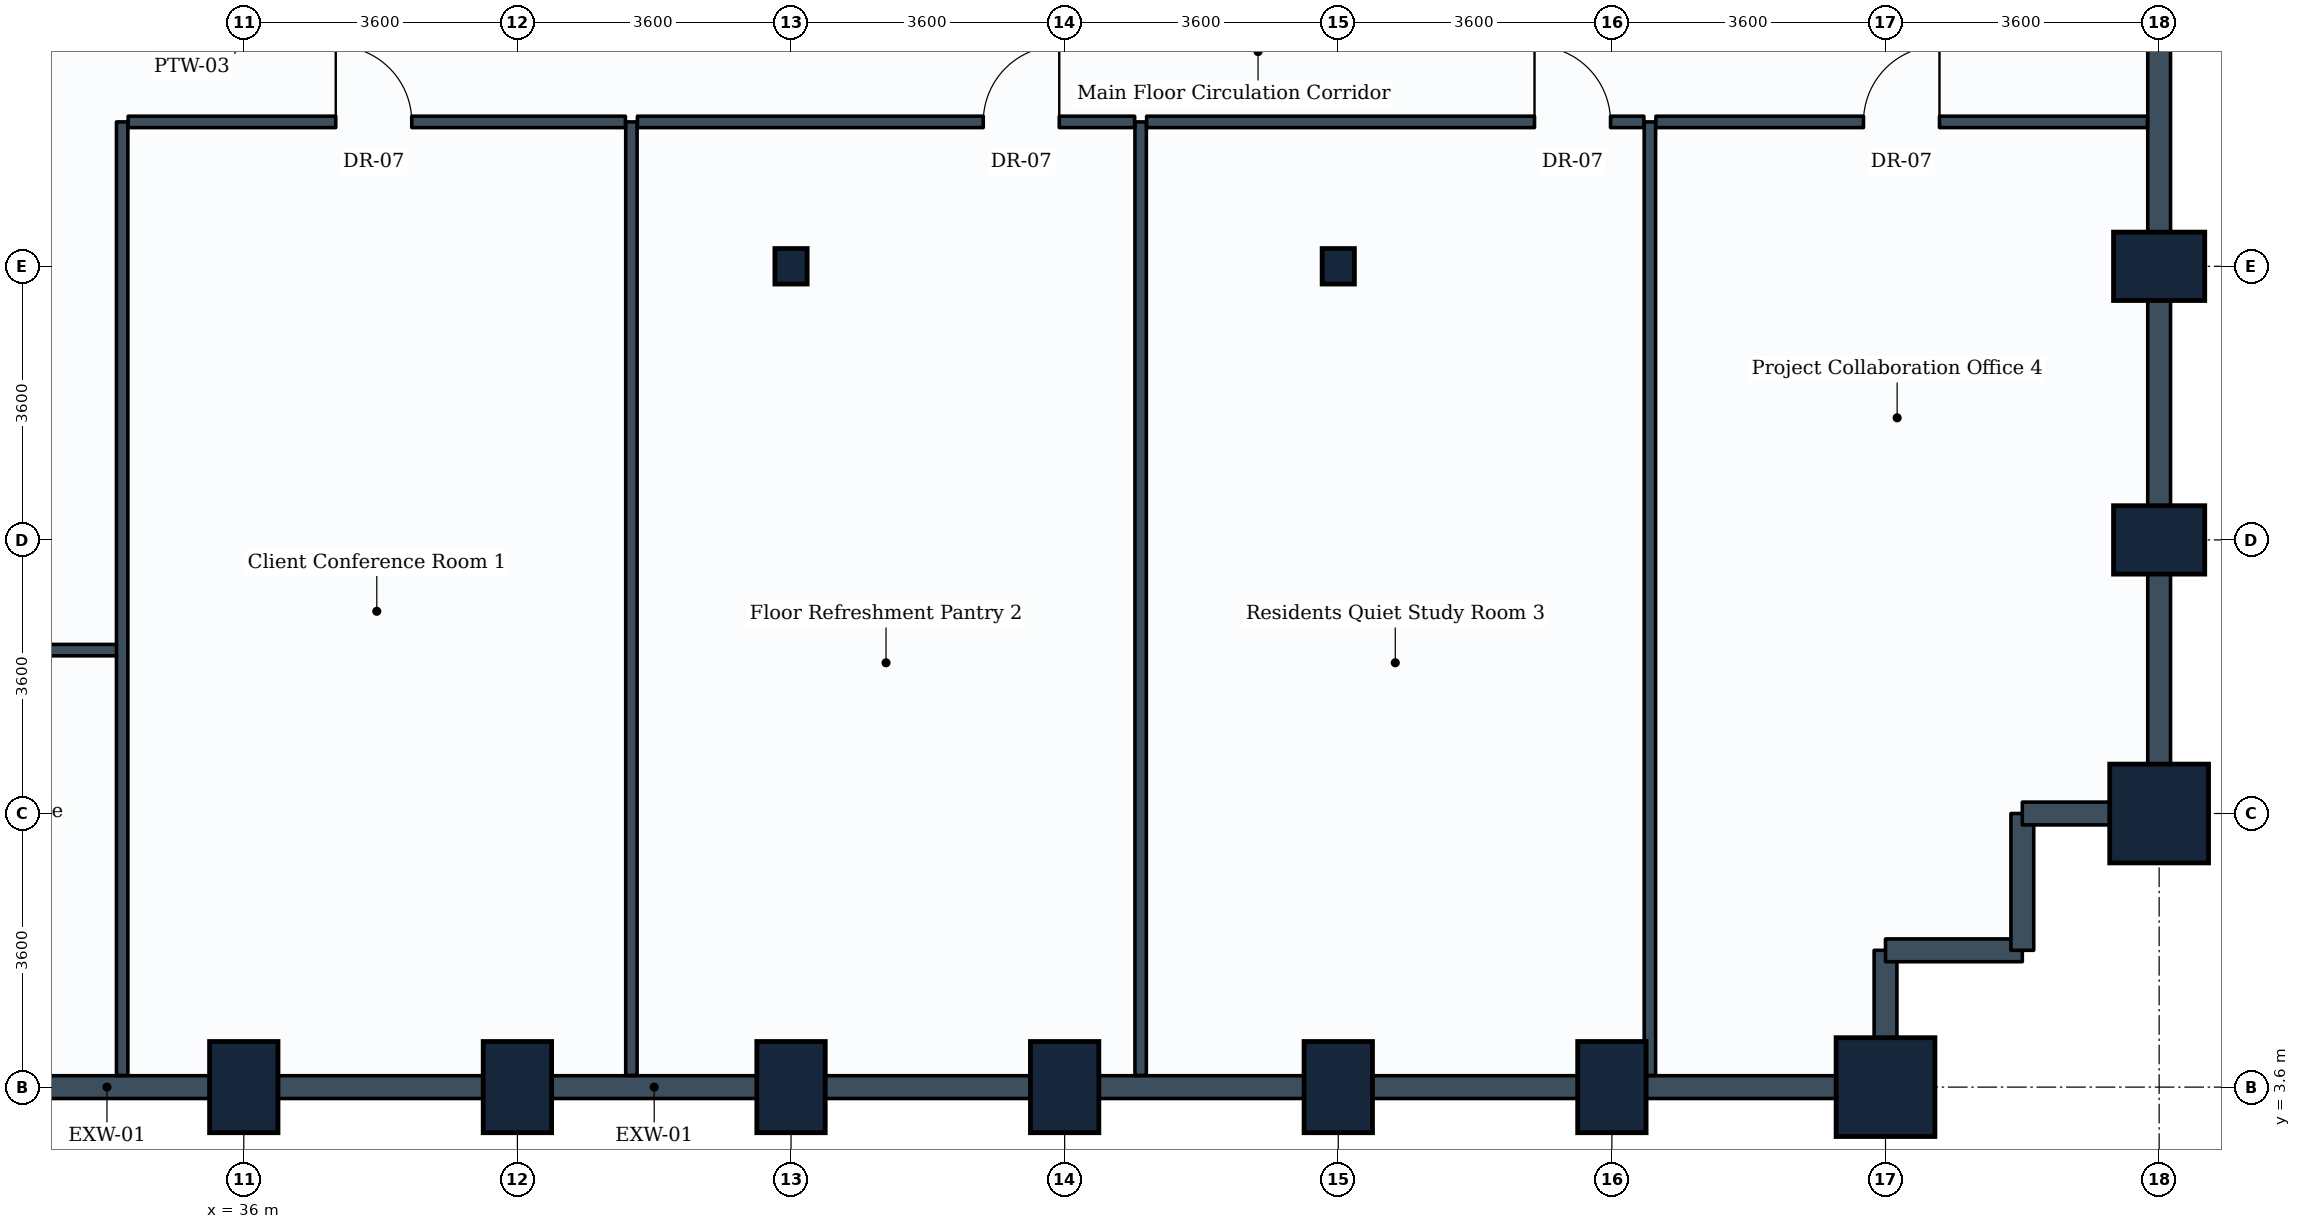
"""IFC4 building model, lengths in metres.
Left out: names, types, materials, properties, quantities, classifications, styles, units other than length and angle.
Written with IfcOpenShell. Run it as: python <this file> out.ifc"""

import sys

from ifc_helpers import new_model, si_unit, direction, frame, frame_2d, origin, origin_2d, place, context, subcontext, project, spatial, rectangle, i_section, extrude, element, fill, save


model = new_model("IFC4")
c1 = context("Model", 3, precision=1e-05, world=origin(), true_north=direction((0.0, 1.0)))
c2 = subcontext(c1, "Body", "Model", "MODEL_VIEW")
j1 = project(units=[si_unit("LENGTHUNIT", "METRE"), si_unit("PLANEANGLEUNIT", "RADIAN")], contexts=[c1])
p1 = place(None, origin())
s1 = spatial("IfcSite", under=j1, at=p1, CompositionType="ELEMENT")
p2 = place(p1, origin())
s2 = spatial("IfcBuilding", under=s1, at=p2, CompositionType="ELEMENT")
p3 = place(p2, frame((0.0, 0.0, 35.7)))
s3 = spatial("IfcBuildingStorey", under=s2, at=p3, CompositionType="ELEMENT", Elevation=35.7)
for number, where, z_axis, x_axis in (
    (1, (36.0, 3.6, 0.0), (0.0, 0.0, 1.0), (1.0, 0.0, 0.0)),
    (2, (39.6, 3.6, 0.0), (0.0, 0.0, 1.0), (1.0, 0.0, 0.0)),
    (3, (43.2, 3.6, 0.0), (0.0, 0.0, 1.0), (1.0, 0.0, 0.0)),
):
    element("IfcColumn", number, at=place(p3, frame(where, z_axis=z_axis, x_axis=x_axis)), inside=s3, PredefinedType="COLUMN", context=c2, shape_type="SweptSolid", body=[
        extrude(rectangle(XDim=0.9, YDim=1.2, at=origin_2d()), origin(), (0.0, 0.0, 1.0), 3.9),
    ])
p4 = place(p3, frame((43.2, 14.4, 0.0), z_axis=(0.0, 0.0, 1.0), x_axis=(1.0, 0.0, 0.0)))
e4 = element("IfcColumn", 4, at=p4, inside=s3, PredefinedType="COLUMN", context=c2, shape_type="SweptSolid", body=[
    extrude(i_section(OverallWidth=0.424, OverallDepth=0.467, WebThickness=0.033, FlangeThickness=0.053, FilletRadius=0.015, at=origin_2d()), origin(), (0.0, 0.0, 1.0), 3.9),
])
for number, where, z_axis, x_axis in (
    (5, (46.8, 3.6, 0.0), (0.0, 0.0, 1.0), (1.0, 0.0, 0.0)),
    (6, (50.4, 3.6, 0.0), (0.0, 0.0, 1.0), (1.0, 0.0, 0.0)),
):
    element("IfcColumn", number, at=place(p3, frame(where, z_axis=z_axis, x_axis=x_axis)), inside=s3, PredefinedType="COLUMN", context=c2, shape_type="SweptSolid", body=[
        extrude(rectangle(XDim=0.9, YDim=1.2, at=origin_2d()), origin(), (0.0, 0.0, 1.0), 3.9),
    ])
p5 = place(p3, frame((50.4, 14.4, 0.0), z_axis=(0.0, 0.0, 1.0), x_axis=(1.0, 0.0, 0.0)))
e7 = element("IfcColumn", 7, at=p5, inside=s3, PredefinedType="COLUMN", context=c2, shape_type="SweptSolid", body=[
    extrude(i_section(OverallWidth=0.424, OverallDepth=0.467, WebThickness=0.033, FlangeThickness=0.053, FilletRadius=0.015, at=origin_2d()), origin(), (0.0, 0.0, 1.0), 3.9),
])
p6 = place(p3, frame((54.0, 3.6, 0.0), z_axis=(0.0, 0.0, 1.0), x_axis=(1.0, 0.0, 0.0)))
e8 = element("IfcColumn", 8, at=p6, inside=s3, PredefinedType="COLUMN", context=c2, shape_type="SweptSolid", body=[
    extrude(rectangle(XDim=0.9, YDim=1.2, at=origin_2d()), origin(), (0.0, 0.0, 1.0), 3.9),
])
for number, where, z_axis, x_axis in (
    (9, (57.6, 3.6, 0.0), (0.0, 0.0, 1.0), (1.0, 0.0, 0.0)),
    (10, (61.2, 7.2, 0.0), (0.0, 0.0, 1.0), (1.0, 0.0, 0.0)),
):
    element("IfcColumn", number, at=place(p3, frame(where, z_axis=z_axis, x_axis=x_axis)), inside=s3, PredefinedType="COLUMN", context=c2, shape_type="SweptSolid", body=[
        extrude(rectangle(XDim=1.3, YDim=1.3, at=origin_2d()), origin(), (0.0, 0.0, 1.0), 3.9),
    ])
for number, where, z_axis, x_axis in (
    (11, (61.2, 10.8, 0.0), (0.0, 0.0, 1.0), (0.0, 1.0, 0.0)),
    (12, (61.2, 14.4, 0.0), (0.0, 0.0, 1.0), (0.0, 1.0, 0.0)),
):
    element("IfcColumn", number, at=place(p3, frame(where, z_axis=z_axis, x_axis=x_axis)), inside=s3, PredefinedType="COLUMN", context=c2, shape_type="SweptSolid", body=[
        extrude(rectangle(XDim=0.9, YDim=1.2, at=origin_2d()), origin(), (0.0, 0.0, 1.0), 3.9),
    ])
for number, where, z_axis, x_axis in (
    (13, (36.0, 3.6, 0.0), (0.0, 0.0, 1.0), (-1.0, 0.0, 0.0)),
    (14, (39.6, 3.6, 0.0), (0.0, 0.0, 1.0), (-1.0, 0.0, 0.0)),
):
    element("IfcWall", number, at=place(p3, frame(where, z_axis=z_axis, x_axis=x_axis)), inside=s3, PredefinedType="STANDARD", context=c2, shape_type="SweptSolid", body=[
        extrude(rectangle(XDim=3.6, YDim=0.3, at=frame_2d((1.8, 0.0))), origin(), (0.0, 0.0, 1.0), 2.93),
    ])
p7 = place(p3, frame((43.2, 3.6, 0.0), z_axis=(0.0, 0.0, 1.0), x_axis=(-1.0, 0.0, 0.0)))
e15 = element("IfcWall", 15, at=p7, inside=s3, PredefinedType="STANDARD", context=c2, shape_type="SweptSolid", body=[
    extrude(rectangle(XDim=3.6, YDim=0.3, at=frame_2d((1.8, 0.0))), origin(), (0.0, 0.0, 1.0), 2.93),
])
p8 = place(p3, frame((46.8, 3.6, 0.0), z_axis=(0.0, 0.0, 1.0), x_axis=(-1.0, 0.0, 0.0)))
e16 = element("IfcWall", 16, at=p8, inside=s3, PredefinedType="STANDARD", context=c2, shape_type="SweptSolid", body=[
    extrude(rectangle(XDim=3.6, YDim=0.3, at=frame_2d((1.8, 0.0))), origin(), (0.0, 0.0, 1.0), 2.93),
])
p9 = place(p3, frame((50.4, 3.6, 0.0), z_axis=(0.0, 0.0, 1.0), x_axis=(-1.0, 0.0, 0.0)))
e17 = element("IfcWall", 17, at=p9, inside=s3, PredefinedType="STANDARD", context=c2, shape_type="SweptSolid", body=[
    extrude(rectangle(XDim=3.6, YDim=0.3, at=frame_2d((1.8, 0.0))), origin(), (0.0, 0.0, 1.0), 2.93),
])
for number, where, z_axis, x_axis in (
    (18, (54.0, 3.6, 0.0), (0.0, 0.0, 1.0), (-1.0, 0.0, 0.0)),
    (19, (57.6, 3.6, 0.0), (0.0, 0.0, 1.0), (-1.0, 0.0, 0.0)),
):
    element("IfcWall", number, at=place(p3, frame(where, z_axis=z_axis, x_axis=x_axis)), inside=s3, PredefinedType="STANDARD", context=c2, shape_type="SweptSolid", body=[
        extrude(rectangle(XDim=3.6, YDim=0.3, at=frame_2d((1.8, 0.0))), origin(), (0.0, 0.0, 1.0), 2.93),
    ])
p10 = place(p3, frame((57.6, 5.4, 0.0), z_axis=(0.0, 0.0, 1.0), x_axis=(0.0, -1.0, 0.0)))
e20 = element("IfcWall", 20, at=p10, inside=s3, PredefinedType="STANDARD", context=c2, shape_type="SweptSolid", body=[
    extrude(rectangle(XDim=1.8, YDim=0.3, at=frame_2d((0.9, 0.0))), origin(), (0.0, 0.0, 1.0), 2.93),
])
p11 = place(p3, frame((59.4, 5.4, 0.0), z_axis=(0.0, 0.0, 1.0), x_axis=(-1.0, 0.0, 0.0)))
e21 = element("IfcWall", 21, at=p11, inside=s3, PredefinedType="STANDARD", context=c2, shape_type="SweptSolid", body=[
    extrude(rectangle(XDim=1.8, YDim=0.3, at=frame_2d((0.9, 0.0))), origin(), (0.0, 0.0, 1.0), 3.635),
])
p12 = place(p3, frame((59.4, 7.2, 0.0), z_axis=(0.0, 0.0, 1.0), x_axis=(0.0, -1.0, 0.0)))
e22 = element("IfcWall", 22, at=p12, inside=s3, PredefinedType="STANDARD", context=c2, shape_type="SweptSolid", body=[
    extrude(rectangle(XDim=1.8, YDim=0.3, at=frame_2d((0.9, 0.0))), origin(), (0.0, 0.0, 1.0), 3.635),
])
p13 = place(p3, frame((61.2, 7.2, 0.0), z_axis=(0.0, 0.0, 1.0), x_axis=(-1.0, 0.0, 0.0)))
e23 = element("IfcWall", 23, at=p13, inside=s3, PredefinedType="STANDARD", context=c2, shape_type="SweptSolid", body=[
    extrude(rectangle(XDim=1.8, YDim=0.3, at=frame_2d((0.9, 0.0))), origin(), (0.0, 0.0, 1.0), 2.93),
])
p14 = place(p3, frame((61.2, 10.8, 0.0), z_axis=(0.0, 0.0, 1.0), x_axis=(0.0, -1.0, 0.0)))
e24 = element("IfcWall", 24, at=p14, inside=s3, PredefinedType="STANDARD", context=c2, shape_type="SweptSolid", body=[
    extrude(rectangle(XDim=3.6, YDim=0.3, at=frame_2d((1.8, 0.0))), origin(), (0.0, 0.0, 1.0), 2.93),
])
p15 = place(p3, frame((61.2, 14.4, 0.0), z_axis=(0.0, 0.0, 1.0), x_axis=(0.0, -1.0, 0.0)))
e25 = element("IfcWall", 25, at=p15, inside=s3, PredefinedType="STANDARD", context=c2, shape_type="SweptSolid", body=[
    extrude(rectangle(XDim=3.6, YDim=0.3, at=frame_2d((1.8, 0.0))), origin(), (0.0, 0.0, 1.0), 2.93),
])
p16 = place(p3, frame((61.2, 18.0, 0.0), z_axis=(0.0, 0.0, 1.0), x_axis=(0.0, -1.0, 0.0)))
e26 = element("IfcWall", 26, at=p16, inside=s3, PredefinedType="STANDARD", context=c2, shape_type="SweptSolid", body=[
    extrude(rectangle(XDim=3.6, YDim=0.3, at=frame_2d((1.8, 0.0))), origin(), (0.0, 0.0, 1.0), 2.93),
])
p17 = place(p3, frame((28.879, 9.35, 0.0), z_axis=(0.0, 0.0, 1.0), x_axis=(1.0, 0.0, 0.0)))
e27 = element("IfcWall", 27, at=p17, inside=s3, PredefinedType="PARTITIONING", context=c2, shape_type="SweptSolid", body=[
    extrude(rectangle(XDim=5.521, YDim=0.15, at=frame_2d((2.76, 0.0))), origin(), (0.0, 0.0, 1.0), 3.635),
])
p18 = place(p17, frame((0.36, 0.0, 0.0)))
e28 = element("IfcOpeningElement", 28, at=p18, cuts=e27, PredefinedType="OPENING", context=c2, shape_type="SweptSolid", body=[
    extrude(rectangle(XDim=1.0, YDim=2.1, at=frame_2d((0.5, 1.05))), frame((0.0, 0.085, 0.0), z_axis=(0.0, -1.0, 0.0), x_axis=(1.0, 0.0, 0.0)), (0.0, 0.0, 1.0), 0.17),
])
for number, where, z_axis, x_axis in (
    (29, (34.4, 3.754, 0.0), (0.0, 0.0, 1.0), (0.0, 1.0, 0.0)),
    (30, (41.1, 3.754, 0.0), (0.0, 0.0, 1.0), (0.0, 1.0, 0.0)),
):
    element("IfcWall", number, at=place(p3, frame(where, z_axis=z_axis, x_axis=x_axis)), inside=s3, PredefinedType="PARTITIONING", context=c2, shape_type="SweptSolid", body=[
        extrude(rectangle(XDim=12.546, YDim=0.15, at=frame_2d((6.273, 0.0))), origin(), (0.0, 0.0, 1.0), 2.93),
    ])
p19 = place(p3, frame((34.479, 16.3, 0.0), z_axis=(0.0, 0.0, 1.0), x_axis=(1.0, 0.0, 0.0)))
e31 = element("IfcWall", 31, at=p19, inside=s3, PredefinedType="PARTITIONING", context=c2, shape_type="SweptSolid", body=[
    extrude(rectangle(XDim=6.542, YDim=0.15, at=frame_2d((3.271, 0.0))), origin(), (0.0, 0.0, 1.0), 3.04),
])
p20 = place(p19, frame((2.731, 0.0, 0.0)))
e32 = element("IfcOpeningElement", 32, at=p20, cuts=e31, PredefinedType="OPENING", context=c2, shape_type="SweptSolid", body=[
    extrude(rectangle(XDim=1.0, YDim=2.1, at=frame_2d((0.5, 1.05))), frame((0.0, 0.085, 0.0), z_axis=(0.0, -1.0, 0.0), x_axis=(1.0, 0.0, 0.0)), (0.0, 0.0, 1.0), 0.17),
])
p21 = place(p3, frame((47.8, 3.754, 0.0), z_axis=(0.0, 0.0, 1.0), x_axis=(0.0, 1.0, 0.0)))
e33 = element("IfcWall", 33, at=p21, inside=s3, PredefinedType="PARTITIONING", context=c2, shape_type="SweptSolid", body=[
    extrude(rectangle(XDim=12.546, YDim=0.15, at=frame_2d((6.273, 0.0))), origin(), (0.0, 0.0, 1.0), 2.93),
])
p22 = place(p3, frame((41.179, 16.3, 0.0), z_axis=(0.0, 0.0, 1.0), x_axis=(1.0, 0.0, 0.0)))
e34 = element("IfcWall", 34, at=p22, inside=s3, PredefinedType="PARTITIONING", context=c2, shape_type="SweptSolid", body=[
    extrude(rectangle(XDim=6.542, YDim=0.15, at=frame_2d((3.271, 0.0))), origin(), (0.0, 0.0, 1.0), 3.04),
])
p23 = place(p22, frame((4.55, 0.0, 0.0)))
e35 = element("IfcOpeningElement", 35, at=p23, cuts=e34, PredefinedType="OPENING", context=c2, shape_type="SweptSolid", body=[
    extrude(rectangle(XDim=1.0, YDim=2.1, at=frame_2d((0.5, 1.05))), frame((0.0, 0.085, 0.0), z_axis=(0.0, -1.0, 0.0), x_axis=(1.0, 0.0, 0.0)), (0.0, 0.0, 1.0), 0.17),
])
p24 = place(p3, frame((54.5, 3.754, 0.0), z_axis=(0.0, 0.0, 1.0), x_axis=(0.0, 1.0, 0.0)))
e36 = element("IfcWall", 36, at=p24, inside=s3, PredefinedType="PARTITIONING", context=c2, shape_type="SweptSolid", body=[
    extrude(rectangle(XDim=12.546, YDim=0.15, at=frame_2d((6.273, 0.0))), origin(), (0.0, 0.0, 1.0), 2.93),
])
p25 = place(p3, frame((47.879, 16.3, 0.0), z_axis=(0.0, 0.0, 1.0), x_axis=(1.0, 0.0, 0.0)))
e37 = element("IfcWall", 37, at=p25, inside=s3, PredefinedType="PARTITIONING", context=c2, shape_type="SweptSolid", body=[
    extrude(rectangle(XDim=6.542, YDim=0.15, at=frame_2d((3.271, 0.0))), origin(), (0.0, 0.0, 1.0), 3.04),
])
p26 = place(p25, frame((5.103, 0.0, 0.0)))
e38 = element("IfcOpeningElement", 38, at=p26, cuts=e37, PredefinedType="OPENING", context=c2, shape_type="SweptSolid", body=[
    extrude(rectangle(XDim=1.0, YDim=2.1, at=frame_2d((0.5, 1.05))), frame((0.0, 0.085, 0.0), z_axis=(0.0, -1.0, 0.0), x_axis=(1.0, 0.0, 0.0)), (0.0, 0.0, 1.0), 0.17),
])
p27 = place(p3, frame((54.579, 16.3, 0.0), z_axis=(0.0, 0.0, 1.0), x_axis=(1.0, 0.0, 0.0)))
e39 = element("IfcWall", 39, at=p27, inside=s3, PredefinedType="PARTITIONING", context=c2, shape_type="SweptSolid", body=[
    extrude(rectangle(XDim=6.467, YDim=0.15, at=frame_2d((3.233, 0.0))), origin(), (0.0, 0.0, 1.0), 2.93),
])
p28 = place(p27, frame((2.731, 0.0, 0.0)))
e40 = element("IfcOpeningElement", 40, at=p28, cuts=e39, PredefinedType="OPENING", context=c2, shape_type="SweptSolid", body=[
    extrude(rectangle(XDim=1.0, YDim=2.1, at=frame_2d((0.5, 1.05))), frame((0.0, 0.085, 0.0), z_axis=(0.0, -1.0, 0.0), x_axis=(1.0, 0.0, 0.0)), (0.0, 0.0, 1.0), 0.17),
])
p29 = place(p20, origin())
e41 = element("IfcDoor", 41, at=p29, inside=s3, OperationType="SINGLE_SWING_LEFT", PredefinedType="DOOR", context=c2, shape_type="SweptSolid", body=[
    extrude(rectangle(XDim=1.0, YDim=2.1, at=frame_2d((0.5, 1.05))), frame((0.0, 0.025, 0.0), z_axis=(0.0, -1.0, 0.0), x_axis=(1.0, 0.0, 0.0)), (0.0, 0.0, 1.0), 0.05),
])
fill(e32, e41)
p30 = place(p23, origin())
e42 = element("IfcDoor", 42, at=p30, inside=s3, OperationType="SINGLE_SWING_RIGHT", PredefinedType="DOOR", context=c2, shape_type="SweptSolid", body=[
    extrude(rectangle(XDim=1.0, YDim=2.1, at=frame_2d((0.5, 1.05))), frame((0.0, 0.025, 0.0), z_axis=(0.0, -1.0, 0.0), x_axis=(1.0, 0.0, 0.0)), (0.0, 0.0, 1.0), 0.05),
])
fill(e35, e42)
p31 = place(p26, origin())
e43 = element("IfcDoor", 43, at=p31, inside=s3, OperationType="SINGLE_SWING_LEFT", PredefinedType="DOOR", context=c2, shape_type="SweptSolid", body=[
    extrude(rectangle(XDim=1.0, YDim=2.1, at=frame_2d((0.5, 1.05))), frame((0.0, 0.025, 0.0), z_axis=(0.0, -1.0, 0.0), x_axis=(1.0, 0.0, 0.0)), (0.0, 0.0, 1.0), 0.05),
])
fill(e38, e43)
p32 = place(p28, origin())
e44 = element("IfcDoor", 44, at=p32, inside=s3, OperationType="SINGLE_SWING_RIGHT", PredefinedType="DOOR", context=c2, shape_type="SweptSolid", body=[
    extrude(rectangle(XDim=1.0, YDim=2.1, at=frame_2d((0.5, 1.05))), frame((0.0, 0.025, 0.0), z_axis=(0.0, -1.0, 0.0), x_axis=(1.0, 0.0, 0.0)), (0.0, 0.0, 1.0), 0.05),
])
fill(e40, e44)
save(model, sys.argv[1])
